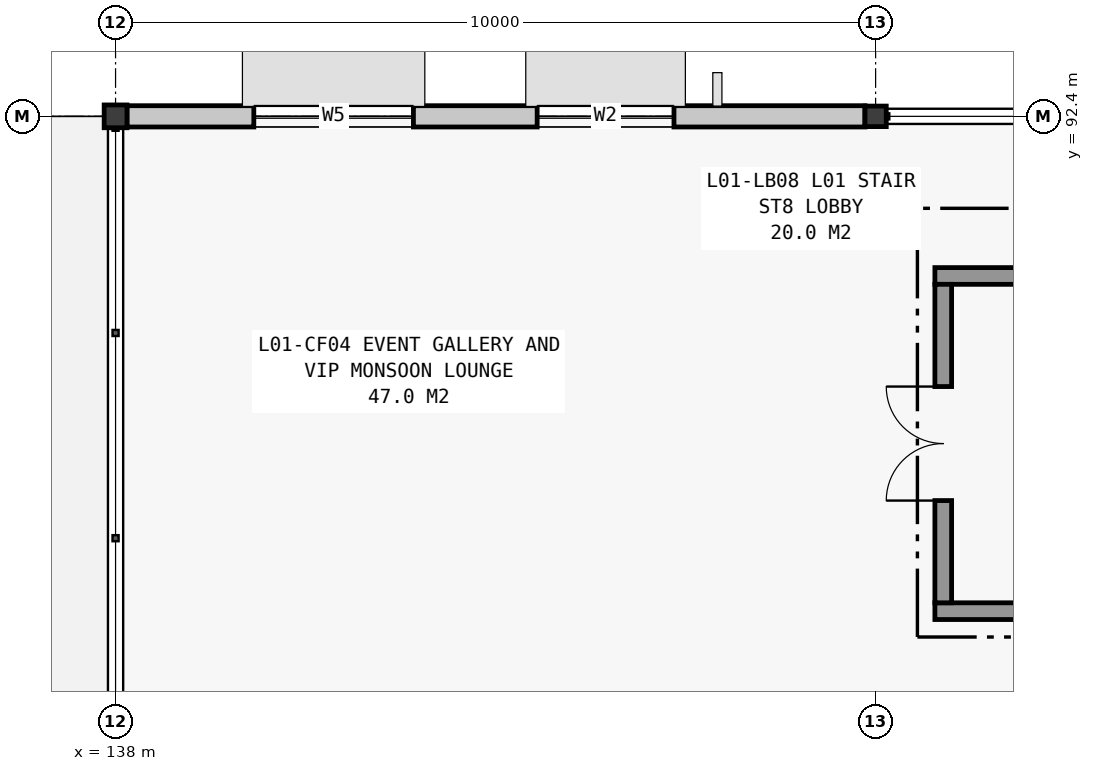
"""IFC4 building model, lengths in metres.
Left out: names, types, materials, properties, quantities, classifications, styles, units other than length and angle.
Written with IfcOpenShell. Run it as: python <this file> out.ifc"""

import sys

from ifc_helpers import new_model, si_unit, direction, frame, frame_2d, origin, origin_2d, place, context, subcontext, project, spatial, rectangle, i_section, extrude, element, fill, save


model = new_model("IFC4")
c1 = context("Model", 3, precision=1e-05, world=origin(), true_north=direction((0.0, 1.0)))
c2 = subcontext(c1, "Body", "Model", "MODEL_VIEW")
j1 = project(units=[si_unit("LENGTHUNIT", "METRE"), si_unit("PLANEANGLEUNIT", "RADIAN")], contexts=[c1])
p1 = place(None, origin())
s1 = spatial("IfcSite", under=j1, at=p1, CompositionType="ELEMENT")
p2 = place(p1, origin())
s2 = spatial("IfcBuilding", under=s1, at=p2, CompositionType="ELEMENT")
p3 = place(p2, frame((0.0, 0.0, 4.8)))
s3 = spatial("IfcBuildingStorey", under=s2, at=p3, CompositionType="ELEMENT", Elevation=4.8)
p4 = place(p3, frame((138.0, 92.4, 0.0), z_axis=(0.0, 0.0, 1.0), x_axis=(1.0, 0.0, 0.0)))
e1 = element("IfcColumn", 1, at=p4, inside=s3, PredefinedType="COLUMN", context=c2, shape_type="SweptSolid", body=[
    extrude(i_section(OverallWidth=0.3, OverallDepth=0.3, WebThickness=0.011, FlangeThickness=0.019, FilletRadius=0.027, at=origin_2d()), origin(), (0.0, 0.0, 1.0), 4.2),
])
p5 = place(p3, frame((148.0, 92.4, 0.0), z_axis=(0.0, 0.0, 1.0), x_axis=(1.0, 0.0, 0.0)))
e2 = element("IfcColumn", 2, at=p5, inside=s3, PredefinedType="COLUMN", context=c2, shape_type="SweptSolid", body=[
    extrude(i_section(OverallWidth=0.28, OverallDepth=0.27, WebThickness=0.008, FlangeThickness=0.013, FilletRadius=0.024, at=origin_2d()), origin(), (0.0, 0.0, 1.0), 4.2),
])
p6 = place(p3, frame((147.86, 92.4, 0.0), z_axis=(0.0, 0.0, 1.0), x_axis=(-1.0, 0.0, 0.0)))
e3 = element("IfcWall", 3, at=p6, inside=s3, PredefinedType="STANDARD", context=c2, shape_type="SweptSolid", body=[
    extrude(rectangle(XDim=9.71, YDim=0.28, at=frame_2d((4.855, 0.0))), origin(), (0.0, 0.0, 1.0), 3.676),
])
p7 = place(p6, frame((2.513, 0.0, 0.9)))
e4 = element("IfcOpeningElement", 4, at=p7, cuts=e3, PredefinedType="OPENING", context=c2, shape_type="SweptSolid", body=[
    extrude(rectangle(XDim=1.8, YDim=1.8, at=frame_2d((0.9, 0.9))), frame((0.0, 0.155, 0.0), z_axis=(0.0, -1.0, 0.0), x_axis=(1.0, 0.0, 0.0)), (0.0, 0.0, 1.0), 0.31),
])
p8 = place(p6, frame((5.941, 0.0, 1.0)))
e5 = element("IfcOpeningElement", 5, at=p8, cuts=e3, PredefinedType="OPENING", context=c2, shape_type="SweptSolid", body=[
    extrude(rectangle(XDim=2.1, YDim=1.6, at=frame_2d((1.05, 0.8))), frame((0.0, 0.155, 0.0), z_axis=(0.0, -1.0, 0.0), x_axis=(1.0, 0.0, 0.0)), (0.0, 0.0, 1.0), 0.31),
])
for number, where, z_axis, x_axis in (
    (6, (148.78, 85.89, 0.0), (0.0, 0.0, 1.0), (1.0, 0.0, 0.0)),
    (7, (158.0, 90.3, 0.0), (0.0, 0.0, 1.0), (-1.0, 0.0, 0.0)),
):
    element("IfcWall", number, at=place(p3, frame(where, z_axis=z_axis, x_axis=x_axis)), inside=s3, PredefinedType="SOLIDWALL", context=c2, shape_type="SweptSolid", body=[
        extrude(rectangle(XDim=9.22, YDim=0.22, at=frame_2d((4.61, 0.0))), origin(), (0.0, 0.0, 1.0), 3.94),
    ])
p9 = place(p3, frame((148.89, 90.19, 0.0), z_axis=(0.0, 0.0, 1.0), x_axis=(0.0, -1.0, 0.0)))
e8 = element("IfcWall", 8, at=p9, inside=s3, PredefinedType="SOLIDWALL", context=c2, shape_type="SweptSolid", body=[
    extrude(rectangle(XDim=4.19, YDim=0.22, at=frame_2d((2.095, 0.0))), origin(), (0.0, 0.0, 1.0), 3.94),
])
p10 = place(p9, frame((1.345, 0.0, 0.0)))
e9 = element("IfcOpeningElement", 9, at=p10, cuts=e8, PredefinedType="OPENING", context=c2, shape_type="SweptSolid", body=[
    extrude(rectangle(XDim=1.5, YDim=2.2, at=frame_2d((0.75, 1.1))), frame((0.0, 0.125, 0.0), z_axis=(0.0, -1.0, 0.0), x_axis=(1.0, 0.0, 0.0)), (0.0, 0.0, 1.0), 0.25),
])
p11 = place(p7, origin())
e10 = element("IfcWindow", 10, at=p11, inside=s3, PartitioningType="SINGLE_PANEL", PredefinedType="WINDOW", context=c2, shape_type="SweptSolid", body=[
    extrude(rectangle(XDim=1.8, YDim=1.8, at=frame_2d((0.9, 0.9))), frame((0.0, 0.03, 0.0), z_axis=(0.0, -1.0, 0.0), x_axis=(1.0, 0.0, 0.0)), (0.0, 0.0, 1.0), 0.06),
])
fill(e4, e10)
p12 = place(p8, origin())
e11 = element("IfcWindow", 11, at=p12, inside=s3, PartitioningType="SINGLE_PANEL", PredefinedType="WINDOW", context=c2, shape_type="SweptSolid", body=[
    extrude(rectangle(XDim=2.1, YDim=1.6, at=frame_2d((1.05, 0.8))), frame((0.0, 0.03, 0.0), z_axis=(0.0, -1.0, 0.0), x_axis=(1.0, 0.0, 0.0)), (0.0, 0.0, 1.0), 0.06),
])
fill(e5, e11)
p13 = place(p10, frame((1.5, 0.0, 0.0), z_axis=(0.0, 0.0, 1.0), x_axis=(-1.0, 0.0, 0.0)))
e12 = element("IfcDoor", 12, at=p13, inside=s3, OperationType="DOUBLE_DOOR_SINGLE_SWING", PredefinedType="DOOR", context=c2, shape_type="SweptSolid", body=[
    extrude(rectangle(XDim=1.5, YDim=2.2, at=frame_2d((0.75, 1.1))), frame((0.0, 0.025, 0.0), z_axis=(0.0, -1.0, 0.0), x_axis=(1.0, 0.0, 0.0)), (0.0, 0.0, 1.0), 0.05),
])
fill(e9, e12)
save(model, sys.argv[1])
